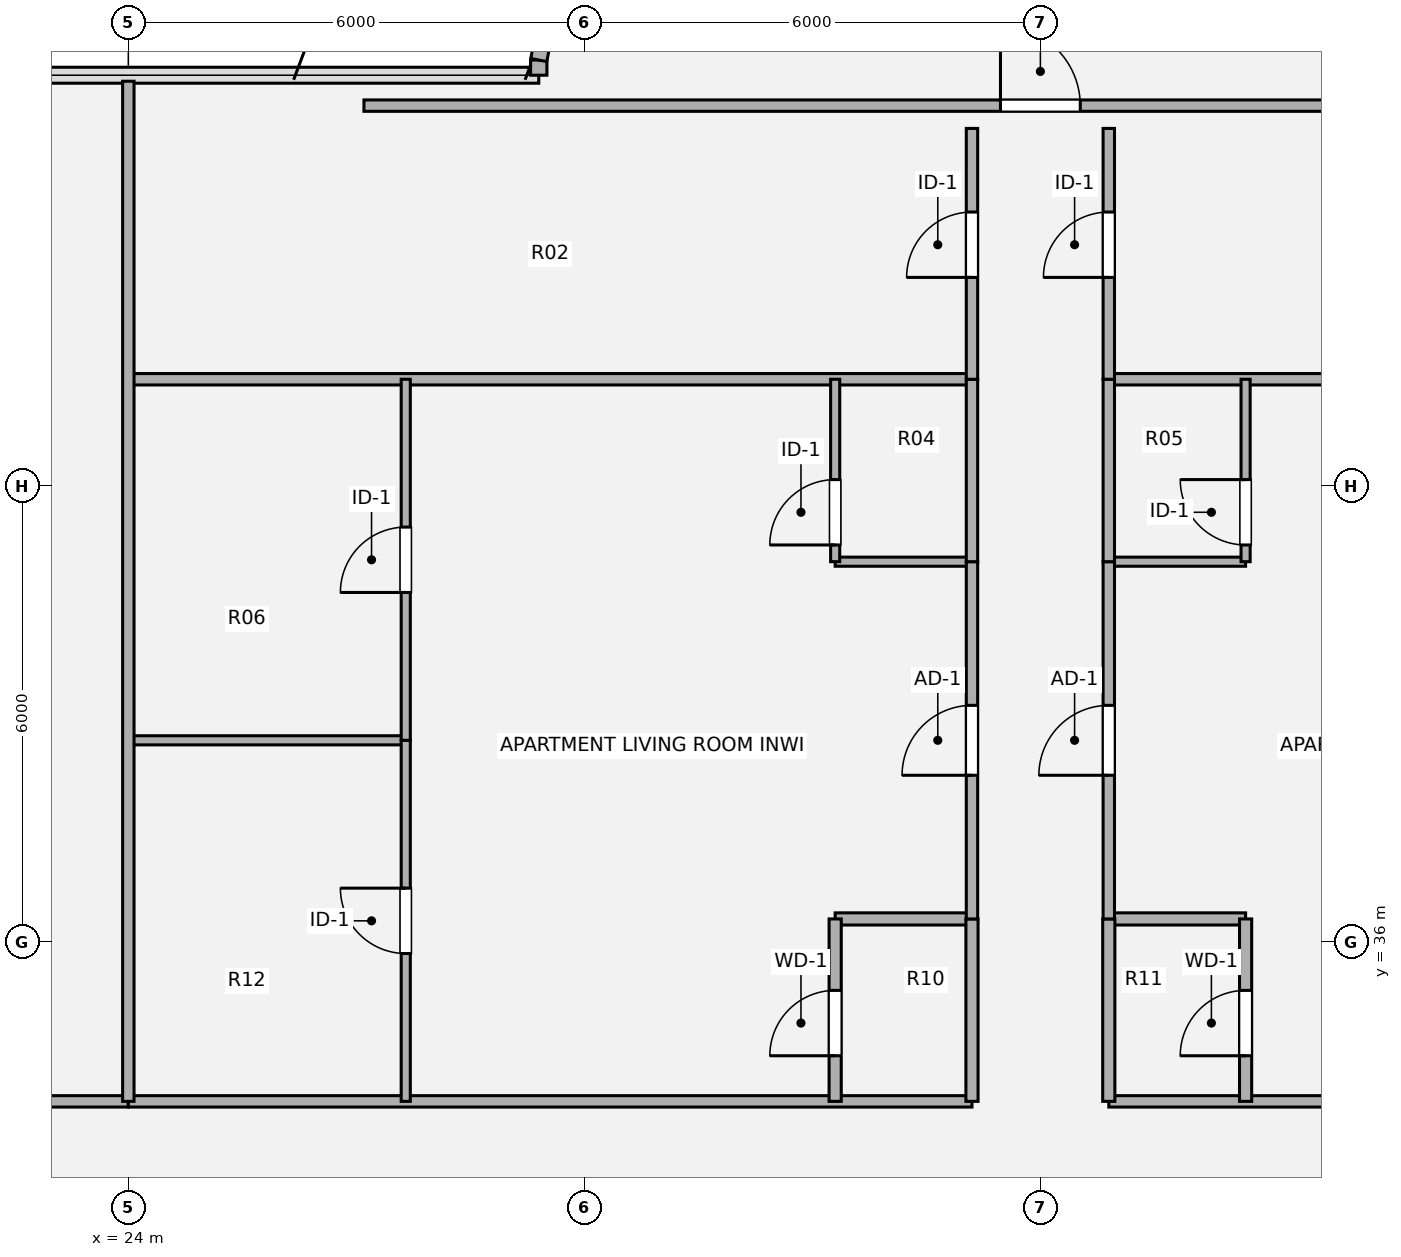
"""IFC4 building model, lengths in metres.
Left out: names, types, materials, properties, quantities, classifications, styles, units other than length and angle.
Written with IfcOpenShell. Run it as: python <this file> out.ifc"""

import sys

from ifc_helpers import new_model, si_unit, direction, frame, frame_2d, origin, origin_2d, place, context, subcontext, project, spatial, rectangle, extrude, source, transform, mapped, element, fill, save


model = new_model("IFC4")
c1 = context("Model", 3, precision=1e-05, world=origin(), true_north=direction((0.0, 1.0)))
c2 = subcontext(c1, "Body", "Model", "MODEL_VIEW")
j1 = project(units=[si_unit("LENGTHUNIT", "METRE"), si_unit("PLANEANGLEUNIT", "RADIAN")], contexts=[c1])
p1 = place(None, origin())
s1 = spatial("IfcSite", under=j1, at=p1, CompositionType="ELEMENT")
p2 = place(p1, origin())
s2 = spatial("IfcBuilding", under=s1, at=p2, CompositionType="ELEMENT")
p3 = place(p2, frame((0.0, 0.0, 89.82)))
s3 = spatial("IfcBuildingStorey", under=s2, at=p3, CompositionType="ELEMENT", Elevation=89.82)
p4 = place(p3, frame((29.4, 47.4, 0.0), z_axis=(0.0, 0.0, 1.0), x_axis=(0.0, 1.0, 0.0)))
e1 = element("IfcWall", 1, at=p4, inside=s3, PredefinedType="SOLIDWALL", context=c2, shape_type="SweptSolid", body=[
    extrude(rectangle(XDim=0.2, YDim=0.215, at=frame_2d((0.1, 0.0))), origin(), (0.0, 0.0, 1.0), 3.53),
])
p5 = place(p3, frame((29.4, 47.6, 0.0), z_axis=(0.0, 0.0, 1.0), x_axis=(0.195127417394, 0.980777900945, 0.0)))
e2 = element("IfcWall", 2, at=p5, inside=s3, PredefinedType="SOLIDWALL", context=c2, shape_type="SweptSolid", body=[
    extrude(rectangle(XDim=1.092, YDim=0.215, at=frame_2d((0.546, 0.0))), origin(), (0.0, 0.0, 1.0), 3.53),
])
p6 = place(p3, frame((13.98, 33.9, 0.0), z_axis=(0.0, 0.0, 1.0), x_axis=(1.0, 0.0, 0.0)))
e3 = element("IfcWall", 3, at=p6, inside=s3, PredefinedType="PARTITIONING", context=c2, shape_type="SweptSolid", body=[
    extrude(rectangle(XDim=10.02, YDim=0.15, at=frame_2d((5.01, 0.0))), origin(), (0.0, 0.0, 1.0), 2.982),
])
p7 = place(p6, frame((6.695, 0.0, 0.0)))
e4 = element("IfcOpeningElement", 4, at=p7, cuts=e3, PredefinedType="OPENING", context=c2, shape_type="SweptSolid", body=[
    extrude(rectangle(XDim=1.05, YDim=2.1, at=origin_2d()), frame((0.525, 0.085, 1.05), z_axis=(0.0, -1.0, 0.0), x_axis=(1.0, 0.0, 0.0)), (0.0, 0.0, 1.0), 0.17),
])
for number, where, z_axis, x_axis in (
    (5, (24.0, 33.9, 0.0), (0.0, 0.0, 1.0), (1.0, 0.0, 0.0)),
    (6, (36.9, 33.9, 0.0), (0.0, 0.0, 1.0), (1.0, 0.0, 0.0)),
):
    element("IfcWall", number, at=place(p3, frame(where, z_axis=z_axis, x_axis=x_axis)), inside=s3, PredefinedType="PARTITIONING", context=c2, shape_type="SweptSolid", body=[
        extrude(rectangle(XDim=11.1, YDim=0.15, at=frame_2d((5.55, 0.0))), origin(), (0.0, 0.0, 1.0), 2.982),
    ])
for number, where, z_axis, x_axis in (
    (7, (33.3, 36.3, 0.0), (0.0, 0.0, 1.0), (1.0, 0.0, 0.0)),
    (8, (36.9, 36.3, 0.0), (0.0, 0.0, 1.0), (1.0, 0.0, 0.0)),
):
    element("IfcWall", number, at=place(p3, frame(where, z_axis=z_axis, x_axis=x_axis)), inside=s3, PredefinedType="PLUMBINGWALL", context=c2, shape_type="SweptSolid", body=[
        extrude(rectangle(XDim=1.8, YDim=0.16, at=frame_2d((0.9, 0.0))), origin(), (0.0, 0.0, 1.0), 3.259),
    ])
p8 = place(p3, frame((24.0, 38.65, 0.0), z_axis=(0.0, 0.0, 1.0), x_axis=(1.0, 0.0, 0.0)))
e9 = element("IfcWall", 9, at=p8, inside=s3, PredefinedType="PARTITIONING", context=c2, shape_type="SweptSolid", body=[
    extrude(rectangle(XDim=3.65, YDim=0.12, at=frame_2d((1.825, 0.0))), origin(), (0.0, 0.0, 1.0), 2.903),
])
for number, where, z_axis, x_axis in (
    (10, (33.3, 41.0, 0.0), (0.0, 0.0, 1.0), (1.0, 0.0, 0.0)),
    (11, (36.9, 41.0, 0.0), (0.0, 0.0, 1.0), (1.0, 0.0, 0.0)),
):
    element("IfcWall", number, at=place(p3, frame(where, z_axis=z_axis, x_axis=x_axis)), inside=s3, PredefinedType="PARTITIONING", context=c2, shape_type="SweptSolid", body=[
        extrude(rectangle(XDim=1.8, YDim=0.12, at=frame_2d((0.9, 0.0))), origin(), (0.0, 0.0, 1.0), 3.259),
    ])
for number, where, z_axis, x_axis in (
    (12, (24.0, 43.4, 0.0), (0.0, 0.0, 1.0), (1.0, 0.0, 0.0)),
    (13, (36.9, 43.4, 0.0), (0.0, 0.0, 1.0), (1.0, 0.0, 0.0)),
):
    element("IfcWall", number, at=place(p3, frame(where, z_axis=z_axis, x_axis=x_axis)), inside=s3, PredefinedType="PARTITIONING", context=c2, shape_type="SweptSolid", body=[
        extrude(rectangle(XDim=11.1, YDim=0.15, at=frame_2d((5.55, 0.0))), origin(), (0.0, 0.0, 1.0), 3.308),
    ])
p9 = place(p3, frame((27.1, 47.0, 0.0), z_axis=(0.0, 0.0, 1.0), x_axis=(1.0, 0.0, 0.0)))
e14 = element("IfcWall", 14, at=p9, inside=s3, PredefinedType="PARTITIONING", context=c2, shape_type="SweptSolid", body=[
    extrude(rectangle(XDim=17.8, YDim=0.15, at=frame_2d((8.9, 0.0))), origin(), (0.0, 0.0, 1.0), 3.308),
])
p10 = place(p9, frame((8.375, 0.0, 0.0)))
e15 = element("IfcOpeningElement", 15, at=p10, cuts=e14, PredefinedType="OPENING", context=c2, shape_type="SweptSolid", body=[
    extrude(rectangle(XDim=1.05, YDim=2.1, at=origin_2d()), frame((0.525, 0.085, 1.05), z_axis=(0.0, -1.0, 0.0), x_axis=(1.0, 0.0, 0.0)), (0.0, 0.0, 1.0), 0.17),
])
p11 = place(p3, frame((24.0, 33.9, 0.0), z_axis=(0.0, 0.0, 1.0), x_axis=(0.0, 1.0, 0.0)))
e16 = element("IfcWall", 16, at=p11, inside=s3, PredefinedType="PARTITIONING", context=c2, shape_type="SweptSolid", body=[
    extrude(rectangle(XDim=13.421, YDim=0.15, at=frame_2d((6.71, 0.0))), origin(), (0.0, 0.0, 1.0), 3.5),
])
p12 = place(p3, frame((27.65, 33.9, 0.0), z_axis=(0.0, 0.0, 1.0), x_axis=(0.0, 1.0, 0.0)))
e17 = element("IfcWall", 17, at=p12, inside=s3, PredefinedType="PARTITIONING", context=c2, shape_type="SweptSolid", body=[
    extrude(rectangle(XDim=4.75, YDim=0.12, at=frame_2d((2.375, 0.0))), origin(), (0.0, 0.0, 1.0), 3.5),
])
p13 = place(p12, frame((1.945, 0.0, 0.0)))
e18 = element("IfcOpeningElement", 18, at=p13, cuts=e17, PredefinedType="OPENING", context=c2, shape_type="SweptSolid", body=[
    extrude(rectangle(XDim=0.86, YDim=2.1, at=origin_2d()), frame((0.43, 0.07, 1.05), z_axis=(0.0, -1.0, 0.0), x_axis=(1.0, 0.0, 0.0)), (0.0, 0.0, 1.0), 0.14),
])
p14 = place(p3, frame((27.65, 38.65, 0.0), z_axis=(0.0, 0.0, 1.0), x_axis=(0.0, 1.0, 0.0)))
e19 = element("IfcWall", 19, at=p14, inside=s3, PredefinedType="PARTITIONING", context=c2, shape_type="SweptSolid", body=[
    extrude(rectangle(XDim=4.75, YDim=0.12, at=frame_2d((2.375, 0.0))), origin(), (0.0, 0.0, 1.0), 3.5),
])
p15 = place(p14, frame((1.945, 0.0, 0.0)))
e20 = element("IfcOpeningElement", 20, at=p15, cuts=e19, PredefinedType="OPENING", context=c2, shape_type="SweptSolid", body=[
    extrude(rectangle(XDim=0.86, YDim=2.1, at=origin_2d()), frame((0.43, 0.07, 1.05), z_axis=(0.0, -1.0, 0.0), x_axis=(1.0, 0.0, 0.0)), (0.0, 0.0, 1.0), 0.14),
])
p16 = place(p3, frame((33.3, 33.9, 0.0), z_axis=(0.0, 0.0, 1.0), x_axis=(0.0, 1.0, 0.0)))
e21 = element("IfcWall", 21, at=p16, inside=s3, PredefinedType="PLUMBINGWALL", context=c2, shape_type="SweptSolid", body=[
    extrude(rectangle(XDim=2.4, YDim=0.16, at=frame_2d((1.2, 0.0))), origin(), (0.0, 0.0, 1.0), 3.5),
])
p17 = place(p16, frame((0.6, 0.0, 0.0)))
e22 = element("IfcOpeningElement", 22, at=p17, cuts=e21, PredefinedType="OPENING", context=c2, shape_type="SweptSolid", body=[
    extrude(rectangle(XDim=0.86, YDim=2.1, at=origin_2d()), frame((0.43, 0.09, 1.05), z_axis=(0.0, -1.0, 0.0), x_axis=(1.0, 0.0, 0.0)), (0.0, 0.0, 1.0), 0.18),
])
p18 = place(p3, frame((33.3, 41.0, 0.0), z_axis=(0.0, 0.0, 1.0), x_axis=(0.0, 1.0, 0.0)))
e23 = element("IfcWall", 23, at=p18, inside=s3, PredefinedType="PARTITIONING", context=c2, shape_type="SweptSolid", body=[
    extrude(rectangle(XDim=2.4, YDim=0.12, at=frame_2d((1.2, 0.0))), origin(), (0.0, 0.0, 1.0), 3.5),
])
p19 = place(p18, frame((0.22, 0.0, 0.0)))
e24 = element("IfcOpeningElement", 24, at=p19, cuts=e23, PredefinedType="OPENING", context=c2, shape_type="SweptSolid", body=[
    extrude(rectangle(XDim=0.86, YDim=2.1, at=origin_2d()), frame((0.43, 0.07, 1.05), z_axis=(0.0, -1.0, 0.0), x_axis=(1.0, 0.0, 0.0)), (0.0, 0.0, 1.0), 0.14),
])
p20 = place(p3, frame((35.1, 33.9, 0.0), z_axis=(0.0, 0.0, 1.0), x_axis=(0.0, 1.0, 0.0)))
e25 = element("IfcWall", 25, at=p20, inside=s3, PredefinedType="PLUMBINGWALL", context=c2, shape_type="SweptSolid", body=[
    extrude(rectangle(XDim=2.4, YDim=0.16, at=frame_2d((1.2, 0.0))), origin(), (0.0, 0.0, 1.0), 3.5),
])
p21 = place(p3, frame((35.1, 36.3, 0.0), z_axis=(0.0, 0.0, 1.0), x_axis=(0.0, 1.0, 0.0)))
e26 = element("IfcWall", 26, at=p21, inside=s3, PredefinedType="PARTITIONING", context=c2, shape_type="SweptSolid", body=[
    extrude(rectangle(XDim=4.7, YDim=0.15, at=frame_2d((2.35, 0.0))), origin(), (0.0, 0.0, 1.0), 3.5),
])
p22 = place(p21, frame((1.89, 0.0, 0.0)))
e27 = element("IfcOpeningElement", 27, at=p22, cuts=e26, PredefinedType="OPENING", context=c2, shape_type="SweptSolid", body=[
    extrude(rectangle(XDim=0.92, YDim=2.1, at=origin_2d()), frame((0.46, 0.085, 1.05), z_axis=(0.0, -1.0, 0.0), x_axis=(1.0, 0.0, 0.0)), (0.0, 0.0, 1.0), 0.17),
])
p23 = place(p3, frame((35.1, 41.0, 0.0), z_axis=(0.0, 0.0, 1.0), x_axis=(0.0, 1.0, 0.0)))
e28 = element("IfcWall", 28, at=p23, inside=s3, PredefinedType="PARTITIONING", context=c2, shape_type="SweptSolid", body=[
    extrude(rectangle(XDim=2.4, YDim=0.15, at=frame_2d((1.2, 0.0))), origin(), (0.0, 0.0, 1.0), 3.5),
])
p24 = place(p3, frame((35.1, 43.4, 0.0), z_axis=(0.0, 0.0, 1.0), x_axis=(0.0, 1.0, 0.0)))
e29 = element("IfcWall", 29, at=p24, inside=s3, PredefinedType="PARTITIONING", context=c2, shape_type="SweptSolid", body=[
    extrude(rectangle(XDim=3.3, YDim=0.15, at=frame_2d((1.65, 0.0))), origin(), (0.0, 0.0, 1.0), 3.5),
])
p25 = place(p24, frame((1.34, 0.0, 0.0)))
e30 = element("IfcOpeningElement", 30, at=p25, cuts=e29, PredefinedType="OPENING", context=c2, shape_type="SweptSolid", body=[
    extrude(rectangle(XDim=0.86, YDim=2.1, at=origin_2d()), frame((0.43, 0.085, 1.05), z_axis=(0.0, -1.0, 0.0), x_axis=(1.0, 0.0, 0.0)), (0.0, 0.0, 1.0), 0.17),
])
p26 = place(p3, frame((36.9, 33.9, 0.0), z_axis=(0.0, 0.0, 1.0), x_axis=(0.0, 1.0, 0.0)))
e31 = element("IfcWall", 31, at=p26, inside=s3, PredefinedType="PLUMBINGWALL", context=c2, shape_type="SweptSolid", body=[
    extrude(rectangle(XDim=2.4, YDim=0.16, at=frame_2d((1.2, 0.0))), origin(), (0.0, 0.0, 1.0), 3.5),
])
p27 = place(p3, frame((36.9, 36.3, 0.0), z_axis=(0.0, 0.0, 1.0), x_axis=(0.0, 1.0, 0.0)))
e32 = element("IfcWall", 32, at=p27, inside=s3, PredefinedType="PARTITIONING", context=c2, shape_type="SweptSolid", body=[
    extrude(rectangle(XDim=4.7, YDim=0.15, at=frame_2d((2.35, 0.0))), origin(), (0.0, 0.0, 1.0), 3.5),
])
p28 = place(p27, frame((1.89, 0.0, 0.0)))
e33 = element("IfcOpeningElement", 33, at=p28, cuts=e32, PredefinedType="OPENING", context=c2, shape_type="SweptSolid", body=[
    extrude(rectangle(XDim=0.92, YDim=2.1, at=origin_2d()), frame((0.46, 0.085, 1.05), z_axis=(0.0, -1.0, 0.0), x_axis=(1.0, 0.0, 0.0)), (0.0, 0.0, 1.0), 0.17),
])
p29 = place(p3, frame((36.9, 41.0, 0.0), z_axis=(0.0, 0.0, 1.0), x_axis=(0.0, 1.0, 0.0)))
e34 = element("IfcWall", 34, at=p29, inside=s3, PredefinedType="PARTITIONING", context=c2, shape_type="SweptSolid", body=[
    extrude(rectangle(XDim=2.4, YDim=0.15, at=frame_2d((1.2, 0.0))), origin(), (0.0, 0.0, 1.0), 3.5),
])
p30 = place(p3, frame((36.9, 43.4, 0.0), z_axis=(0.0, 0.0, 1.0), x_axis=(0.0, 1.0, 0.0)))
e35 = element("IfcWall", 35, at=p30, inside=s3, PredefinedType="PARTITIONING", context=c2, shape_type="SweptSolid", body=[
    extrude(rectangle(XDim=3.3, YDim=0.15, at=frame_2d((1.65, 0.0))), origin(), (0.0, 0.0, 1.0), 3.5),
])
p31 = place(p30, frame((1.34, 0.0, 0.0)))
e36 = element("IfcOpeningElement", 36, at=p31, cuts=e35, PredefinedType="OPENING", context=c2, shape_type="SweptSolid", body=[
    extrude(rectangle(XDim=0.86, YDim=2.1, at=origin_2d()), frame((0.43, 0.085, 1.05), z_axis=(0.0, -1.0, 0.0), x_axis=(1.0, 0.0, 0.0)), (0.0, 0.0, 1.0), 0.17),
])
p32 = place(p3, frame((38.7, 33.9, 0.0), z_axis=(0.0, 0.0, 1.0), x_axis=(0.0, 1.0, 0.0)))
e37 = element("IfcWall", 37, at=p32, inside=s3, PredefinedType="PLUMBINGWALL", context=c2, shape_type="SweptSolid", body=[
    extrude(rectangle(XDim=2.4, YDim=0.16, at=frame_2d((1.2, 0.0))), origin(), (0.0, 0.0, 1.0), 3.5),
])
p33 = place(p32, frame((0.6, 0.0, 0.0)))
e38 = element("IfcOpeningElement", 38, at=p33, cuts=e37, PredefinedType="OPENING", context=c2, shape_type="SweptSolid", body=[
    extrude(rectangle(XDim=0.86, YDim=2.1, at=origin_2d()), frame((0.43, 0.09, 1.05), z_axis=(0.0, -1.0, 0.0), x_axis=(1.0, 0.0, 0.0)), (0.0, 0.0, 1.0), 0.18),
])
p34 = place(p3, frame((38.7, 41.0, 0.0), z_axis=(0.0, 0.0, 1.0), x_axis=(0.0, 1.0, 0.0)))
e39 = element("IfcWall", 39, at=p34, inside=s3, PredefinedType="PARTITIONING", context=c2, shape_type="SweptSolid", body=[
    extrude(rectangle(XDim=2.4, YDim=0.12, at=frame_2d((1.2, 0.0))), origin(), (0.0, 0.0, 1.0), 3.5),
])
p35 = place(p34, frame((0.22, 0.0, 0.0)))
e40 = element("IfcOpeningElement", 40, at=p35, cuts=e39, PredefinedType="OPENING", context=c2, shape_type="SweptSolid", body=[
    extrude(rectangle(XDim=0.86, YDim=2.1, at=origin_2d()), frame((0.43, 0.07, 1.05), z_axis=(0.0, -1.0, 0.0), x_axis=(1.0, 0.0, 0.0)), (0.0, 0.0, 1.0), 0.14),
])
m1 = source(origin(), c2, "Body", "SweptSolid", [
    extrude(rectangle(XDim=1.05, YDim=2.1, at=origin_2d()), frame((0.525, 0.025, 1.05), z_axis=(0.0, -1.0, 0.0), x_axis=(1.0, 0.0, 0.0)), (0.0, 0.0, 1.0), 0.05),
])
p36 = place(p10, origin())
e41 = element("IfcDoor", 41, at=p36, inside=s3, OperationType="SINGLE_SWING_LEFT", PredefinedType="DOOR", context=c2, shape_type="MappedRepresentation", body=[
    mapped(m1, transform((0.0, 0.0, 0.0), x_axis=(1.0, 0.0, 0.0), y_axis=(0.0, 1.0, 0.0), z_axis=(0.0, 0.0, 1.0), scale=1.0)),
])
fill(e15, e41)
m2 = source(origin(), c2, "Body", "SweptSolid", [
    extrude(rectangle(XDim=0.86, YDim=2.1, at=origin_2d()), frame((0.43, 0.025, 1.05), z_axis=(0.0, -1.0, 0.0), x_axis=(1.0, 0.0, 0.0)), (0.0, 0.0, 1.0), 0.05),
])
p37 = place(p13, origin())
e42 = element("IfcDoor", 42, at=p37, inside=s3, OperationType="SINGLE_SWING_RIGHT", PredefinedType="DOOR", context=c2, shape_type="MappedRepresentation", body=[
    mapped(m2, transform((0.0, 0.0, 0.0), x_axis=(1.0, 0.0, 0.0), y_axis=(0.0, 1.0, 0.0), z_axis=(0.0, 0.0, 1.0), scale=1.0)),
])
fill(e18, e42)
p38 = place(p15, origin())
e43 = element("IfcDoor", 43, at=p38, inside=s3, OperationType="SINGLE_SWING_LEFT", PredefinedType="DOOR", context=c2, shape_type="MappedRepresentation", body=[
    mapped(m2, transform((0.0, 0.0, 0.0), x_axis=(1.0, 0.0, 0.0), y_axis=(0.0, 1.0, 0.0), z_axis=(0.0, 0.0, 1.0), scale=1.0)),
])
fill(e20, e43)
m3 = source(origin(), c2, "Body", "SweptSolid", [
    extrude(rectangle(XDim=0.86, YDim=2.1, at=origin_2d()), frame((0.43, 0.025, 1.05), z_axis=(0.0, -1.0, 0.0), x_axis=(1.0, 0.0, 0.0)), (0.0, 0.0, 1.0), 0.05),
])
p39 = place(p17, origin())
e44 = element("IfcDoor", 44, at=p39, inside=s3, OperationType="SINGLE_SWING_LEFT", PredefinedType="DOOR", context=c2, shape_type="MappedRepresentation", body=[
    mapped(m3, transform((0.0, 0.0, 0.0), x_axis=(1.0, 0.0, 0.0), y_axis=(0.0, 1.0, 0.0), z_axis=(0.0, 0.0, 1.0), scale=1.0)),
])
fill(e22, e44)
p40 = place(p19, origin())
e45 = element("IfcDoor", 45, at=p40, inside=s3, OperationType="SINGLE_SWING_LEFT", PredefinedType="DOOR", context=c2, shape_type="MappedRepresentation", body=[
    mapped(m2, transform((0.0, 0.0, 0.0), x_axis=(1.0, 0.0, 0.0), y_axis=(0.0, 1.0, 0.0), z_axis=(0.0, 0.0, 1.0), scale=1.0)),
])
fill(e24, e45)
m4 = source(origin(), c2, "Body", "SweptSolid", [
    extrude(rectangle(XDim=0.92, YDim=2.1, at=origin_2d()), frame((0.46, 0.025, 1.05), z_axis=(0.0, -1.0, 0.0), x_axis=(1.0, 0.0, 0.0)), (0.0, 0.0, 1.0), 0.05),
])
p41 = place(p22, origin())
e46 = element("IfcDoor", 46, at=p41, inside=s3, OperationType="SINGLE_SWING_LEFT", PredefinedType="DOOR", context=c2, shape_type="MappedRepresentation", body=[
    mapped(m4, transform((0.0, 0.0, 0.0), x_axis=(1.0, 0.0, 0.0), y_axis=(0.0, 1.0, 0.0), z_axis=(0.0, 0.0, 1.0), scale=1.0)),
])
fill(e27, e46)
p42 = place(p25, origin())
e47 = element("IfcDoor", 47, at=p42, inside=s3, OperationType="SINGLE_SWING_LEFT", PredefinedType="DOOR", context=c2, shape_type="MappedRepresentation", body=[
    mapped(m2, transform((0.0, 0.0, 0.0), x_axis=(1.0, 0.0, 0.0), y_axis=(0.0, 1.0, 0.0), z_axis=(0.0, 0.0, 1.0), scale=1.0)),
])
fill(e30, e47)
p43 = place(p28, origin())
e48 = element("IfcDoor", 48, at=p43, inside=s3, OperationType="SINGLE_SWING_LEFT", PredefinedType="DOOR", context=c2, shape_type="MappedRepresentation", body=[
    mapped(m4, transform((0.0, 0.0, 0.0), x_axis=(1.0, 0.0, 0.0), y_axis=(0.0, 1.0, 0.0), z_axis=(0.0, 0.0, 1.0), scale=1.0)),
])
fill(e33, e48)
p44 = place(p31, origin())
e49 = element("IfcDoor", 49, at=p44, inside=s3, OperationType="SINGLE_SWING_LEFT", PredefinedType="DOOR", context=c2, shape_type="MappedRepresentation", body=[
    mapped(m2, transform((0.0, 0.0, 0.0), x_axis=(1.0, 0.0, 0.0), y_axis=(0.0, 1.0, 0.0), z_axis=(0.0, 0.0, 1.0), scale=1.0)),
])
fill(e36, e49)
p45 = place(p33, origin())
e50 = element("IfcDoor", 50, at=p45, inside=s3, OperationType="SINGLE_SWING_LEFT", PredefinedType="DOOR", context=c2, shape_type="MappedRepresentation", body=[
    mapped(m3, transform((0.0, 0.0, 0.0), x_axis=(1.0, 0.0, 0.0), y_axis=(0.0, 1.0, 0.0), z_axis=(0.0, 0.0, 1.0), scale=1.0)),
])
fill(e38, e50)
p46 = place(p35, origin())
e51 = element("IfcDoor", 51, at=p46, inside=s3, OperationType="SINGLE_SWING_RIGHT", PredefinedType="DOOR", context=c2, shape_type="MappedRepresentation", body=[
    mapped(m2, transform((0.0, 0.0, 0.0), x_axis=(1.0, 0.0, 0.0), y_axis=(0.0, 1.0, 0.0), z_axis=(0.0, 0.0, 1.0), scale=1.0)),
])
fill(e40, e51)
save(model, sys.argv[1])
